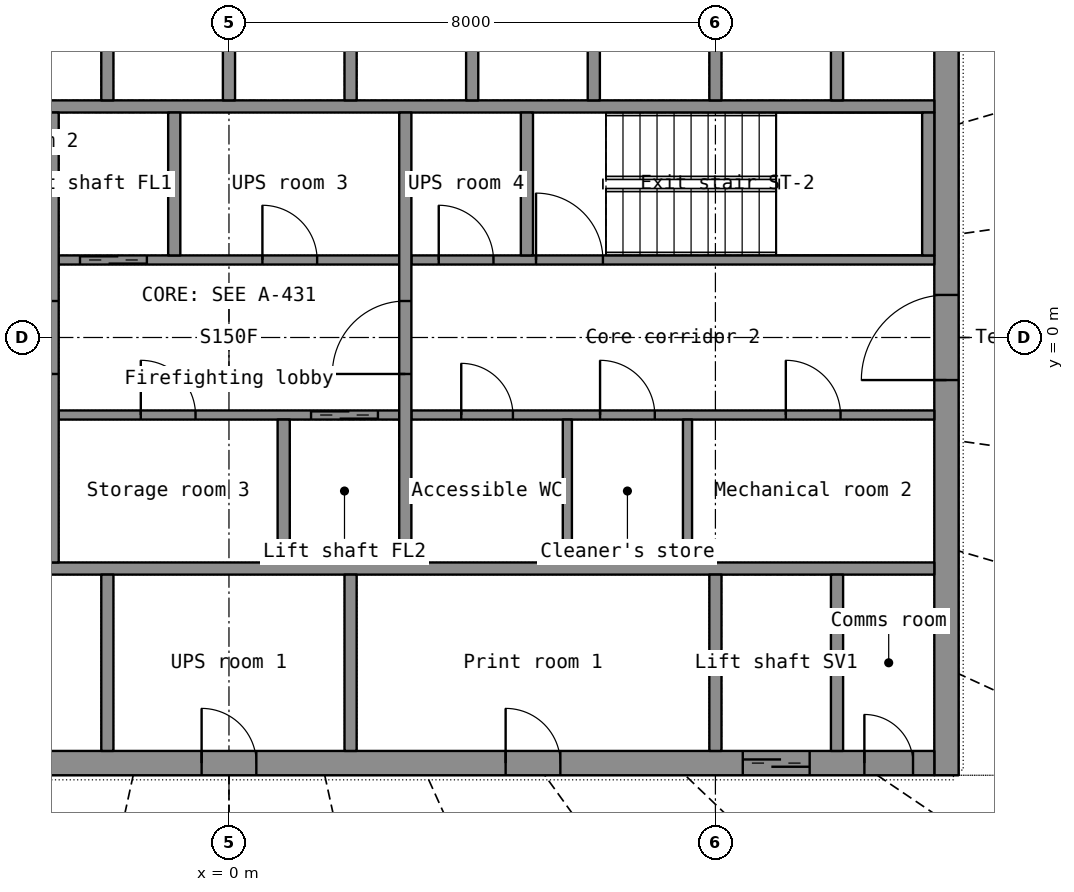
"""IFC4 building model, lengths in metres.
Left out: names, types, materials, properties, quantities, classifications, styles, units other than length and angle.
Written with IfcOpenShell. Run it as: python <this file> out.ifc"""

import sys

from ifc_helpers import new_model, si_unit, direction, frame, frame_2d, origin, place, context, subcontext, project, spatial, rectangle, extrude, element, fill, save


model = new_model("IFC4")
c1 = context("Model", 3, precision=1e-05, world=origin(), true_north=direction((0.0, 1.0)))
c2 = subcontext(c1, "Body", "Model", "MODEL_VIEW")
j1 = project(units=[si_unit("LENGTHUNIT", "METRE"), si_unit("PLANEANGLEUNIT", "RADIAN")], contexts=[c1])
p1 = place(None, origin())
s1 = spatial("IfcSite", under=j1, at=p1, CompositionType="ELEMENT")
p2 = place(p1, origin())
s2 = spatial("IfcBuilding", under=s1, at=p2, CompositionType="ELEMENT")
p3 = place(p2, frame((0.0, 0.0, 243.0)))
s3 = spatial("IfcBuildingStorey", under=s2, at=p3, CompositionType="ELEMENT", Elevation=243.0)
p4 = place(p3, frame((11.8, -7.2, 0.0), z_axis=(0.0, 0.0, 1.0), x_axis=(0.0, 1.0, 0.0)))
e1 = element("IfcWall", 1, at=p4, inside=s3, PredefinedType="SHEAR", context=c2, shape_type="SweptSolid", body=[
    extrude(rectangle(XDim=14.4, YDim=0.4, at=frame_2d((7.2, 0.0))), origin(), (0.0, 0.0, 1.0), 3.3),
])
p5 = place(p4, frame((6.5, 0.0, 0.0)))
e2 = element("IfcOpeningElement", 2, at=p5, cuts=e1, PredefinedType="OPENING", context=c2, shape_type="SweptSolid", body=[
    extrude(rectangle(XDim=1.4, YDim=2.2, at=frame_2d((0.7, 1.1))), frame((0.0, 0.21, 0.0), z_axis=(0.0, -1.0, 0.0), x_axis=(1.0, 0.0, 0.0)), (0.0, 0.0, 1.0), 0.42),
])
p6 = place(p3, frame((-11.6, -7.0, 0.0), z_axis=(0.0, 0.0, 1.0), x_axis=(1.0, 0.0, 0.0)))
e3 = element("IfcWall", 3, at=p6, inside=s3, PredefinedType="SHEAR", context=c2, shape_type="SweptSolid", body=[
    extrude(rectangle(XDim=23.2, YDim=0.4, at=frame_2d((11.6, 0.0))), origin(), (0.0, 0.0, 1.0), 3.3),
])
p7 = place(p6, frame((20.05, 0.0, 0.0)))
e4 = element("IfcOpeningElement", 4, at=p7, cuts=e3, PredefinedType="OPENING", context=c2, shape_type="SweptSolid", body=[
    extrude(rectangle(XDim=1.1, YDim=2.2, at=frame_2d((0.55, 1.1))), frame((0.0, 0.21, 0.0), z_axis=(0.0, -1.0, 0.0), x_axis=(1.0, 0.0, 0.0)), (0.0, 0.0, 1.0), 0.42),
])
p8 = place(p6, frame((5.15, 0.0, 0.0)))
e5 = element("IfcOpeningElement", 5, at=p8, cuts=e3, PredefinedType="OPENING", context=c2, shape_type="SweptSolid", body=[
    extrude(rectangle(XDim=0.9, YDim=2.1, at=frame_2d((0.45, 1.05))), frame((0.0, 0.21, 0.0), z_axis=(0.0, -1.0, 0.0), x_axis=(1.0, 0.0, 0.0)), (0.0, 0.0, 1.0), 0.42),
])
p9 = place(p6, frame((11.15, 0.0, 0.0)))
e6 = element("IfcOpeningElement", 6, at=p9, cuts=e3, PredefinedType="OPENING", context=c2, shape_type="SweptSolid", body=[
    extrude(rectangle(XDim=0.9, YDim=2.1, at=frame_2d((0.45, 1.05))), frame((0.0, 0.21, 0.0), z_axis=(0.0, -1.0, 0.0), x_axis=(1.0, 0.0, 0.0)), (0.0, 0.0, 1.0), 0.42),
])
p10 = place(p6, frame((16.15, 0.0, 0.0)))
e7 = element("IfcOpeningElement", 7, at=p10, cuts=e3, PredefinedType="OPENING", context=c2, shape_type="SweptSolid", body=[
    extrude(rectangle(XDim=0.9, YDim=2.1, at=frame_2d((0.45, 1.05))), frame((0.0, 0.21, 0.0), z_axis=(0.0, -1.0, 0.0), x_axis=(1.0, 0.0, 0.0)), (0.0, 0.0, 1.0), 0.42),
])
p11 = place(p6, frame((0.35, 0.0, 0.0)))
e8 = element("IfcOpeningElement", 8, at=p11, cuts=e3, PredefinedType="OPENING", context=c2, shape_type="SweptSolid", body=[
    extrude(rectangle(XDim=0.8, YDim=2.05, at=frame_2d((0.4, 1.025))), frame((0.0, 0.21, 0.0), z_axis=(0.0, -1.0, 0.0), x_axis=(1.0, 0.0, 0.0)), (0.0, 0.0, 1.0), 0.42),
])
p12 = place(p6, frame((22.05, 0.0, 0.0)))
e9 = element("IfcOpeningElement", 9, at=p12, cuts=e3, PredefinedType="OPENING", context=c2, shape_type="SweptSolid", body=[
    extrude(rectangle(XDim=0.8, YDim=2.05, at=frame_2d((0.4, 1.025))), frame((0.0, 0.21, 0.0), z_axis=(0.0, -1.0, 0.0), x_axis=(1.0, 0.0, 0.0)), (0.0, 0.0, 1.0), 0.42),
])
for number, where, z_axis, x_axis in (
    (10, (-11.6, -3.8, 0.0), (0.0, 0.0, 1.0), (1.0, 0.0, 0.0)),
    (11, (-11.6, 3.8, 0.0), (0.0, 0.0, 1.0), (1.0, 0.0, 0.0)),
):
    element("IfcWall", number, at=place(p3, frame(where, z_axis=z_axis, x_axis=x_axis)), inside=s3, PredefinedType="SHEAR", context=c2, shape_type="SweptSolid", body=[
        extrude(rectangle(XDim=23.2, YDim=0.2, at=frame_2d((11.6, 0.0))), origin(), (0.0, 0.0, 1.0), 3.3),
    ])
for number, where, z_axis, x_axis in (
    (12, (8.0, -6.8, 0.0), (0.0, 0.0, 1.0), (0.0, 1.0, 0.0)),
    (13, (10.0, -6.8, 0.0), (0.0, 0.0, 1.0), (0.0, 1.0, 0.0)),
):
    element("IfcWall", number, at=place(p3, frame(where, z_axis=z_axis, x_axis=x_axis)), inside=s3, PredefinedType="SHEAR", context=c2, shape_type="SweptSolid", body=[
        extrude(rectangle(XDim=2.9, YDim=0.2, at=frame_2d((1.45, 0.0))), origin(), (0.0, 0.0, 1.0), 3.3),
    ])
for number, where, z_axis, x_axis in (
    (14, (-2.0, -6.8, 0.0), (0.0, 0.0, 1.0), (0.0, 1.0, 0.0)),
    (15, (2.0, -6.8, 0.0), (0.0, 0.0, 1.0), (0.0, 1.0, 0.0)),
):
    element("IfcWall", number, at=place(p3, frame(where, z_axis=z_axis, x_axis=x_axis)), inside=s3, PredefinedType="PARTITIONING", context=c2, shape_type="SweptSolid", body=[
        extrude(rectangle(XDim=2.9, YDim=0.2, at=frame_2d((1.45, 0.0))), origin(), (0.0, 0.0, 1.0), 3.3),
    ])
for number, where, z_axis, x_axis in (
    (16, (-2.0, 3.9, 0.0), (0.0, 0.0, 1.0), (0.0, 1.0, 0.0)),
    (17, (0.0, 3.9, 0.0), (0.0, 0.0, 1.0), (0.0, 1.0, 0.0)),
    (18, (2.0, 3.9, 0.0), (0.0, 0.0, 1.0), (0.0, 1.0, 0.0)),
    (19, (4.0, 3.9, 0.0), (0.0, 0.0, 1.0), (0.0, 1.0, 0.0)),
    (20, (6.0, 3.9, 0.0), (0.0, 0.0, 1.0), (0.0, 1.0, 0.0)),
    (21, (8.0, 3.9, 0.0), (0.0, 0.0, 1.0), (0.0, 1.0, 0.0)),
    (22, (10.0, 3.9, 0.0), (0.0, 0.0, 1.0), (0.0, 1.0, 0.0)),
):
    element("IfcWall", number, at=place(p3, frame(where, z_axis=z_axis, x_axis=x_axis)), inside=s3, PredefinedType="SHEAR", context=c2, shape_type="SweptSolid", body=[
        extrude(rectangle(XDim=2.9, YDim=0.2, at=frame_2d((1.45, 0.0))), origin(), (0.0, 0.0, 1.0), 3.3),
    ])
p13 = place(p3, frame((-2.8, -1.275, 0.0), z_axis=(0.0, 0.0, 1.0), x_axis=(1.0, 0.0, 0.0)))
e23 = element("IfcWall", 23, at=p13, inside=s3, PredefinedType="SHEAR", context=c2, shape_type="SweptSolid", body=[
    extrude(rectangle(XDim=5.6, YDim=0.15, at=frame_2d((2.8, 0.0))), origin(), (0.0, 0.0, 1.0), 3.3),
])
p14 = place(p13, frame((4.15, 0.0, 0.0)))
e24 = element("IfcOpeningElement", 24, at=p14, cuts=e23, PredefinedType="OPENING", context=c2, shape_type="SweptSolid", body=[
    extrude(rectangle(XDim=1.1, YDim=2.2, at=frame_2d((0.55, 1.1))), frame((0.0, 0.085, 0.0), z_axis=(0.0, -1.0, 0.0), x_axis=(1.0, 0.0, 0.0)), (0.0, 0.0, 1.0), 0.17),
])
p15 = place(p13, frame((1.35, 0.0, 0.0)))
e25 = element("IfcOpeningElement", 25, at=p15, cuts=e23, PredefinedType="OPENING", context=c2, shape_type="SweptSolid", body=[
    extrude(rectangle(XDim=0.9, YDim=2.1, at=frame_2d((0.45, 1.05))), frame((0.0, 0.085, 0.0), z_axis=(0.0, -1.0, 0.0), x_axis=(1.0, 0.0, 0.0)), (0.0, 0.0, 1.0), 0.17),
])
p16 = place(p3, frame((3.0, -1.275, 0.0), z_axis=(0.0, 0.0, 1.0), x_axis=(1.0, 0.0, 0.0)))
e26 = element("IfcWall", 26, at=p16, inside=s3, PredefinedType="PARTITIONING", context=c2, shape_type="SweptSolid", body=[
    extrude(rectangle(XDim=8.6, YDim=0.15, at=frame_2d((4.3, 0.0))), origin(), (0.0, 0.0, 1.0), 3.3),
])
p17 = place(p16, frame((0.82, 0.0, 0.0)))
e27 = element("IfcOpeningElement", 27, at=p17, cuts=e26, PredefinedType="OPENING", context=c2, shape_type="SweptSolid", body=[
    extrude(rectangle(XDim=0.85, YDim=2.1, at=frame_2d((0.425, 1.05))), frame((0.0, 0.085, 0.0), z_axis=(0.0, -1.0, 0.0), x_axis=(1.0, 0.0, 0.0)), (0.0, 0.0, 1.0), 0.17),
])
p18 = place(p16, frame((3.103, 0.0, 0.0)))
e28 = element("IfcOpeningElement", 28, at=p18, cuts=e26, PredefinedType="OPENING", context=c2, shape_type="SweptSolid", body=[
    extrude(rectangle(XDim=0.9, YDim=2.1, at=frame_2d((0.45, 1.05))), frame((0.0, 0.085, 0.0), z_axis=(0.0, -1.0, 0.0), x_axis=(1.0, 0.0, 0.0)), (0.0, 0.0, 1.0), 0.17),
])
p19 = place(p16, frame((6.158, 0.0, 0.0)))
e29 = element("IfcOpeningElement", 29, at=p19, cuts=e26, PredefinedType="OPENING", context=c2, shape_type="SweptSolid", body=[
    extrude(rectangle(XDim=0.9, YDim=2.1, at=frame_2d((0.45, 1.05))), frame((0.0, 0.085, 0.0), z_axis=(0.0, -1.0, 0.0), x_axis=(1.0, 0.0, 0.0)), (0.0, 0.0, 1.0), 0.17),
])
p20 = place(p3, frame((-2.8, 1.275, 0.0), z_axis=(0.0, 0.0, 1.0), x_axis=(1.0, 0.0, 0.0)))
e30 = element("IfcWall", 30, at=p20, inside=s3, PredefinedType="SHEAR", context=c2, shape_type="SweptSolid", body=[
    extrude(rectangle(XDim=5.6, YDim=0.15, at=frame_2d((2.8, 0.0))), origin(), (0.0, 0.0, 1.0), 3.3),
])
p21 = place(p20, frame((0.35, 0.0, 0.0)))
e31 = element("IfcOpeningElement", 31, at=p21, cuts=e30, PredefinedType="OPENING", context=c2, shape_type="SweptSolid", body=[
    extrude(rectangle(XDim=1.1, YDim=2.2, at=frame_2d((0.55, 1.1))), frame((0.0, 0.085, 0.0), z_axis=(0.0, -1.0, 0.0), x_axis=(1.0, 0.0, 0.0)), (0.0, 0.0, 1.0), 0.17),
])
p22 = place(p20, frame((3.35, 0.0, 0.0)))
e32 = element("IfcOpeningElement", 32, at=p22, cuts=e30, PredefinedType="OPENING", context=c2, shape_type="SweptSolid", body=[
    extrude(rectangle(XDim=0.9, YDim=2.1, at=frame_2d((0.45, 1.05))), frame((0.0, 0.085, 0.0), z_axis=(0.0, -1.0, 0.0), x_axis=(1.0, 0.0, 0.0)), (0.0, 0.0, 1.0), 0.17),
])
p23 = place(p3, frame((3.0, 1.275, 0.0), z_axis=(0.0, 0.0, 1.0), x_axis=(1.0, 0.0, 0.0)))
e33 = element("IfcWall", 33, at=p23, inside=s3, PredefinedType="SHEAR", context=c2, shape_type="SweptSolid", body=[
    extrude(rectangle(XDim=8.6, YDim=0.15, at=frame_2d((4.3, 0.0))), origin(), (0.0, 0.0, 1.0), 3.3),
])
p24 = place(p23, frame((2.05, 0.0, 0.0)))
e34 = element("IfcOpeningElement", 34, at=p24, cuts=e33, PredefinedType="OPENING", context=c2, shape_type="SweptSolid", body=[
    extrude(rectangle(XDim=1.1, YDim=2.15, at=frame_2d((0.55, 1.075))), frame((0.0, 0.085, 0.0), z_axis=(0.0, -1.0, 0.0), x_axis=(1.0, 0.0, 0.0)), (0.0, 0.0, 1.0), 0.17),
])
p25 = place(p23, frame((0.45, 0.0, 0.0)))
e35 = element("IfcOpeningElement", 35, at=p25, cuts=e33, PredefinedType="OPENING", context=c2, shape_type="SweptSolid", body=[
    extrude(rectangle(XDim=0.9, YDim=2.1, at=frame_2d((0.45, 1.05))), frame((0.0, 0.085, 0.0), z_axis=(0.0, -1.0, 0.0), x_axis=(1.0, 0.0, 0.0)), (0.0, 0.0, 1.0), 0.17),
])
p26 = place(p3, frame((-2.9, -3.7, 0.0), z_axis=(0.0, 0.0, 1.0), x_axis=(0.0, 1.0, 0.0)))
e36 = element("IfcWall", 36, at=p26, inside=s3, PredefinedType="SHEAR", context=c2, shape_type="SweptSolid", body=[
    extrude(rectangle(XDim=7.4, YDim=0.2, at=frame_2d((3.7, 0.0))), origin(), (0.0, 0.0, 1.0), 3.3),
])
p27 = place(p26, frame((3.1, 0.0, 0.0)))
e37 = element("IfcOpeningElement", 37, at=p27, cuts=e36, PredefinedType="OPENING", context=c2, shape_type="SweptSolid", body=[
    extrude(rectangle(XDim=1.2, YDim=2.2, at=frame_2d((0.6, 1.1))), frame((0.0, 0.11, 0.0), z_axis=(0.0, -1.0, 0.0), x_axis=(1.0, 0.0, 0.0)), (0.0, 0.0, 1.0), 0.22),
])
p28 = place(p3, frame((2.9, -3.7, 0.0), z_axis=(0.0, 0.0, 1.0), x_axis=(0.0, 1.0, 0.0)))
e38 = element("IfcWall", 38, at=p28, inside=s3, PredefinedType="SHEAR", context=c2, shape_type="SweptSolid", body=[
    extrude(rectangle(XDim=7.4, YDim=0.2, at=frame_2d((3.7, 0.0))), origin(), (0.0, 0.0, 1.0), 3.3),
])
p29 = place(p28, frame((3.1, 0.0, 0.0)))
e39 = element("IfcOpeningElement", 39, at=p29, cuts=e38, PredefinedType="OPENING", context=c2, shape_type="SweptSolid", body=[
    extrude(rectangle(XDim=1.2, YDim=2.2, at=frame_2d((0.6, 1.1))), frame((0.0, 0.11, 0.0), z_axis=(0.0, -1.0, 0.0), x_axis=(1.0, 0.0, 0.0)), (0.0, 0.0, 1.0), 0.22),
])
for number, where, z_axis, x_axis in (
    (40, (-0.9, 1.35, 0.0), (0.0, 0.0, 1.0), (0.0, 1.0, 0.0)),
    (41, (0.9, -3.7, 0.0), (0.0, 0.0, 1.0), (0.0, 1.0, 0.0)),
    (42, (11.5, 1.35, 0.0), (0.0, 0.0, 1.0), (0.0, 1.0, 0.0)),
    (43, (4.9, 1.35, 0.0), (0.0, 0.0, 1.0), (0.0, 1.0, 0.0)),
):
    element("IfcWall", number, at=place(p3, frame(where, z_axis=z_axis, x_axis=x_axis)), inside=s3, PredefinedType="SHEAR", context=c2, shape_type="SweptSolid", body=[
        extrude(rectangle(XDim=2.35, YDim=0.2, at=frame_2d((1.175, 0.0))), origin(), (0.0, 0.0, 1.0), 3.3),
    ])
for number, where, z_axis, x_axis in (
    (44, (5.565, -3.7, 0.0), (0.0, 0.0, 1.0), (0.0, 1.0, 0.0)),
    (45, (7.541, -3.7, 0.0), (0.0, 0.0, 1.0), (0.0, 1.0, 0.0)),
):
    element("IfcWall", number, at=place(p3, frame(where, z_axis=z_axis, x_axis=x_axis)), inside=s3, PredefinedType="PARTITIONING", context=c2, shape_type="SweptSolid", body=[
        extrude(rectangle(XDim=2.35, YDim=0.15, at=frame_2d((1.175, 0.0))), origin(), (0.0, 0.0, 1.0), 3.3),
    ])
p30 = place(p7, origin())
e46 = element("IfcDoor", 46, at=p30, inside=s3, OperationType="DOUBLE_DOOR_SLIDING", PredefinedType="DOOR", context=c2, shape_type="SweptSolid", body=[
    extrude(rectangle(XDim=1.1, YDim=2.2, at=frame_2d((0.55, 1.1))), frame((0.0, 0.025, 0.0), z_axis=(0.0, -1.0, 0.0), x_axis=(1.0, 0.0, 0.0)), (0.0, 0.0, 1.0), 0.05),
])
fill(e4, e46)
p31 = place(p9, origin())
e47 = element("IfcDoor", 47, at=p31, inside=s3, OperationType="SINGLE_SWING_LEFT", PredefinedType="DOOR", context=c2, shape_type="SweptSolid", body=[
    extrude(rectangle(XDim=0.9, YDim=2.1, at=frame_2d((0.45, 1.05))), frame((0.0, 0.025, 0.0), z_axis=(0.0, -1.0, 0.0), x_axis=(1.0, 0.0, 0.0)), (0.0, 0.0, 1.0), 0.05),
])
fill(e6, e47)
p32 = place(p10, origin())
e48 = element("IfcDoor", 48, at=p32, inside=s3, OperationType="SINGLE_SWING_LEFT", PredefinedType="DOOR", context=c2, shape_type="SweptSolid", body=[
    extrude(rectangle(XDim=0.9, YDim=2.1, at=frame_2d((0.45, 1.05))), frame((0.0, 0.025, 0.0), z_axis=(0.0, -1.0, 0.0), x_axis=(1.0, 0.0, 0.0)), (0.0, 0.0, 1.0), 0.05),
])
fill(e7, e48)
p33 = place(p12, origin())
e49 = element("IfcDoor", 49, at=p33, inside=s3, OperationType="SINGLE_SWING_LEFT", PredefinedType="DOOR", context=c2, shape_type="SweptSolid", body=[
    extrude(rectangle(XDim=0.8, YDim=2.05, at=frame_2d((0.4, 1.025))), frame((0.0, 0.025, 0.0), z_axis=(0.0, -1.0, 0.0), x_axis=(1.0, 0.0, 0.0)), (0.0, 0.0, 1.0), 0.05),
])
fill(e9, e49)
p34 = place(p5, origin())
e50 = element("IfcDoor", 50, at=p34, inside=s3, OperationType="DOUBLE_DOOR_SINGLE_SWING", PredefinedType="DOOR", context=c2, shape_type="SweptSolid", body=[
    extrude(rectangle(XDim=1.4, YDim=2.2, at=frame_2d((0.7, 1.1))), frame((0.0, 0.025, 0.0), z_axis=(0.0, -1.0, 0.0), x_axis=(1.0, 0.0, 0.0)), (0.0, 0.0, 1.0), 0.05),
])
fill(e2, e50)
p35 = place(p27, origin())
e51 = element("IfcDoor", 51, at=p35, inside=s3, OperationType="SINGLE_SWING_LEFT", PredefinedType="DOOR", context=c2, shape_type="SweptSolid", body=[
    extrude(rectangle(XDim=1.2, YDim=2.2, at=frame_2d((0.6, 1.1))), frame((0.0, 0.025, 0.0), z_axis=(0.0, -1.0, 0.0), x_axis=(1.0, 0.0, 0.0)), (0.0, 0.0, 1.0), 0.05),
])
fill(e37, e51)
p36 = place(p29, origin())
e52 = element("IfcDoor", 52, at=p36, inside=s3, OperationType="SINGLE_SWING_LEFT", PredefinedType="DOOR", context=c2, shape_type="SweptSolid", body=[
    extrude(rectangle(XDim=1.2, YDim=2.2, at=frame_2d((0.6, 1.1))), frame((0.0, 0.025, 0.0), z_axis=(0.0, -1.0, 0.0), x_axis=(1.0, 0.0, 0.0)), (0.0, 0.0, 1.0), 0.05),
])
fill(e39, e52)
p37 = place(p21, origin())
e53 = element("IfcDoor", 53, at=p37, inside=s3, OperationType="DOUBLE_DOOR_SLIDING", PredefinedType="DOOR", context=c2, shape_type="SweptSolid", body=[
    extrude(rectangle(XDim=1.1, YDim=2.2, at=frame_2d((0.55, 1.1))), frame((0.0, 0.025, 0.0), z_axis=(0.0, -1.0, 0.0), x_axis=(1.0, 0.0, 0.0)), (0.0, 0.0, 1.0), 0.05),
])
fill(e31, e53)
p38 = place(p14, origin())
e54 = element("IfcDoor", 54, at=p38, inside=s3, OperationType="DOUBLE_DOOR_SLIDING", PredefinedType="DOOR", context=c2, shape_type="SweptSolid", body=[
    extrude(rectangle(XDim=1.1, YDim=2.2, at=frame_2d((0.55, 1.1))), frame((0.0, 0.025, 0.0), z_axis=(0.0, -1.0, 0.0), x_axis=(1.0, 0.0, 0.0)), (0.0, 0.0, 1.0), 0.05),
])
fill(e24, e54)
p39 = place(p24, origin())
e55 = element("IfcDoor", 55, at=p39, inside=s3, OperationType="SINGLE_SWING_LEFT", PredefinedType="DOOR", context=c2, shape_type="SweptSolid", body=[
    extrude(rectangle(XDim=1.1, YDim=2.15, at=frame_2d((0.55, 1.075))), frame((0.0, 0.025, 0.0), z_axis=(0.0, -1.0, 0.0), x_axis=(1.0, 0.0, 0.0)), (0.0, 0.0, 1.0), 0.05),
])
fill(e34, e55)
p40 = place(p17, origin())
e56 = element("IfcDoor", 56, at=p40, inside=s3, OperationType="SINGLE_SWING_LEFT", PredefinedType="DOOR", context=c2, shape_type="SweptSolid", body=[
    extrude(rectangle(XDim=0.85, YDim=2.1, at=frame_2d((0.425, 1.05))), frame((0.0, 0.025, 0.0), z_axis=(0.0, -1.0, 0.0), x_axis=(1.0, 0.0, 0.0)), (0.0, 0.0, 1.0), 0.05),
])
fill(e27, e56)
p41 = place(p18, origin())
e57 = element("IfcDoor", 57, at=p41, inside=s3, OperationType="SINGLE_SWING_LEFT", PredefinedType="DOOR", context=c2, shape_type="SweptSolid", body=[
    extrude(rectangle(XDim=0.9, YDim=2.1, at=frame_2d((0.45, 1.05))), frame((0.0, 0.025, 0.0), z_axis=(0.0, -1.0, 0.0), x_axis=(1.0, 0.0, 0.0)), (0.0, 0.0, 1.0), 0.05),
])
fill(e28, e57)
p42 = place(p19, origin())
e58 = element("IfcDoor", 58, at=p42, inside=s3, OperationType="SINGLE_SWING_LEFT", PredefinedType="DOOR", context=c2, shape_type="SweptSolid", body=[
    extrude(rectangle(XDim=0.9, YDim=2.1, at=frame_2d((0.45, 1.05))), frame((0.0, 0.025, 0.0), z_axis=(0.0, -1.0, 0.0), x_axis=(1.0, 0.0, 0.0)), (0.0, 0.0, 1.0), 0.05),
])
fill(e29, e58)
p43 = place(p22, origin())
e59 = element("IfcDoor", 59, at=p43, inside=s3, OperationType="SINGLE_SWING_LEFT", PredefinedType="DOOR", context=c2, shape_type="SweptSolid", body=[
    extrude(rectangle(XDim=0.9, YDim=2.1, at=frame_2d((0.45, 1.05))), frame((0.0, 0.025, 0.0), z_axis=(0.0, -1.0, 0.0), x_axis=(1.0, 0.0, 0.0)), (0.0, 0.0, 1.0), 0.05),
])
fill(e32, e59)
p44 = place(p15, origin())
e60 = element("IfcDoor", 60, at=p44, inside=s3, OperationType="SINGLE_SWING_LEFT", PredefinedType="DOOR", context=c2, shape_type="SweptSolid", body=[
    extrude(rectangle(XDim=0.9, YDim=2.1, at=frame_2d((0.45, 1.05))), frame((0.0, 0.025, 0.0), z_axis=(0.0, -1.0, 0.0), x_axis=(1.0, 0.0, 0.0)), (0.0, 0.0, 1.0), 0.05),
])
fill(e25, e60)
p45 = place(p25, origin())
e61 = element("IfcDoor", 61, at=p45, inside=s3, OperationType="SINGLE_SWING_LEFT", PredefinedType="DOOR", context=c2, shape_type="SweptSolid", body=[
    extrude(rectangle(XDim=0.9, YDim=2.1, at=frame_2d((0.45, 1.05))), frame((0.0, 0.025, 0.0), z_axis=(0.0, -1.0, 0.0), x_axis=(1.0, 0.0, 0.0)), (0.0, 0.0, 1.0), 0.05),
])
fill(e35, e61)
save(model, sys.argv[1])
